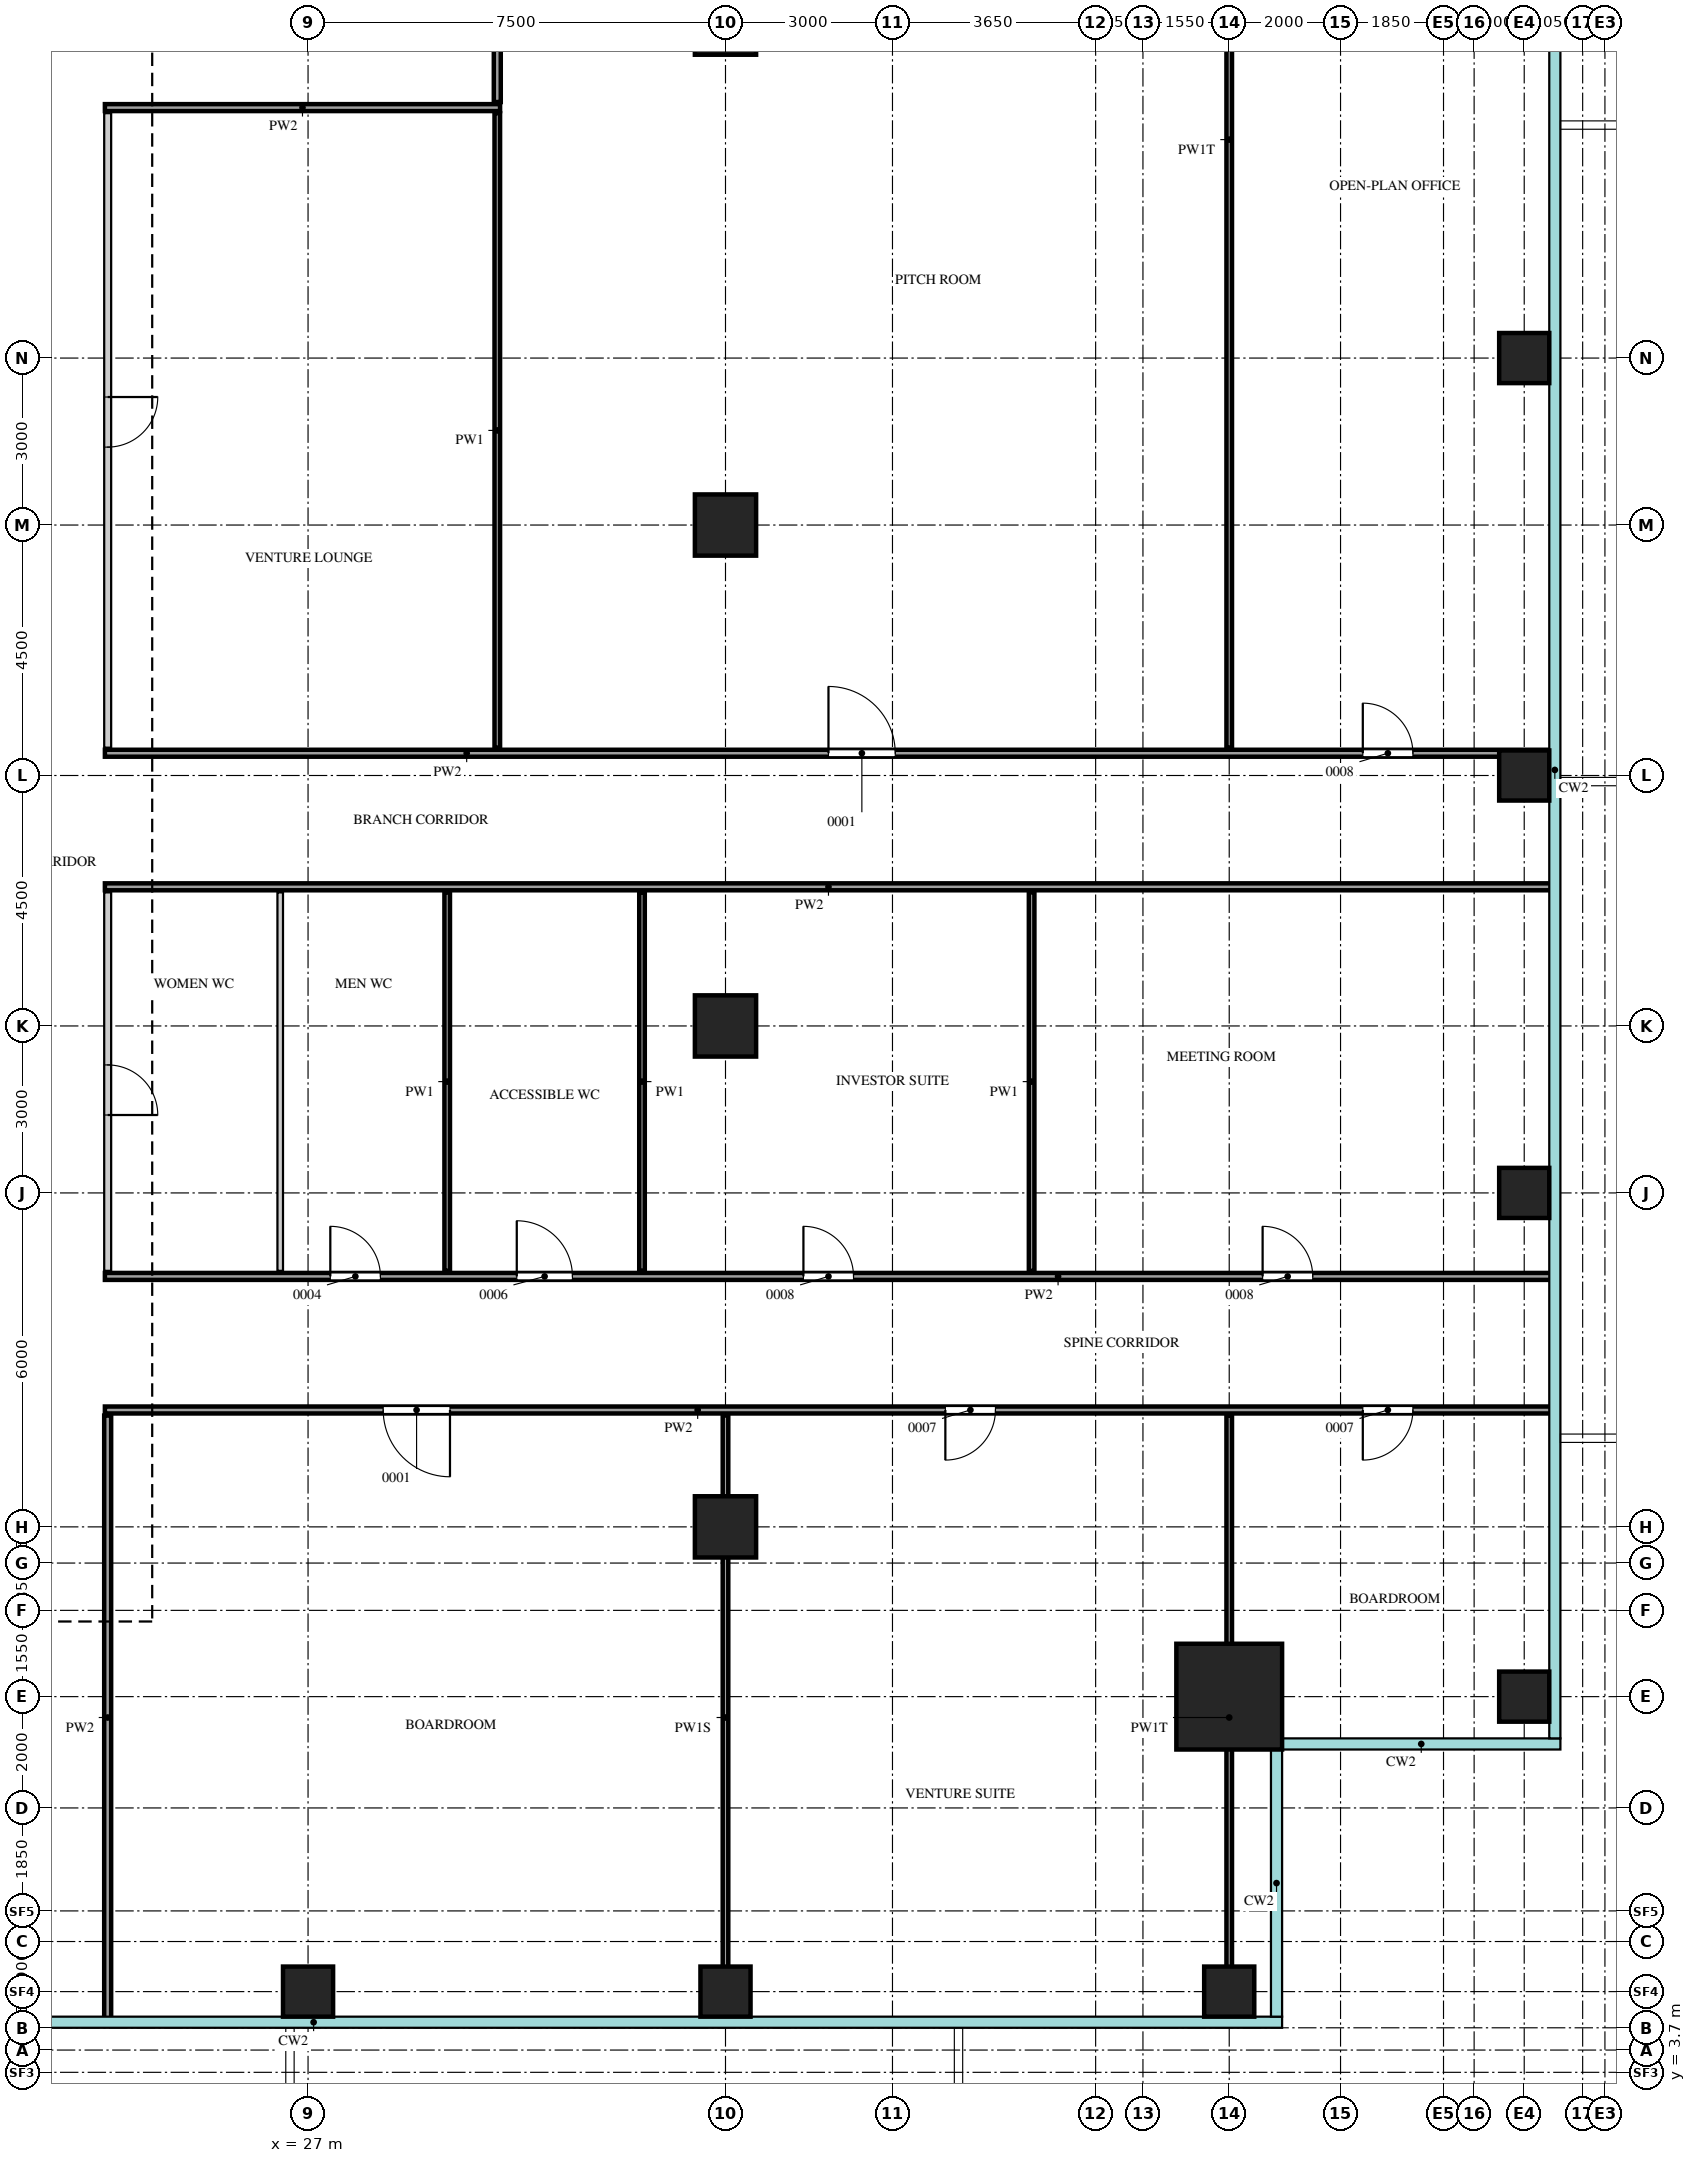
"""IFC4 building model, lengths in metres.
Left out: names, types, materials, properties, quantities, classifications, styles, units other than length and angle.
Written with IfcOpenShell. Run it as: python <this file> out.ifc"""

import sys

from ifc_helpers import new_model, si_unit, direction, frame, frame_2d, origin, origin_2d, place, context, subcontext, project, spatial, rectangle, extrude, source, transform, mapped, element, fill, save


model = new_model("IFC4")
c1 = context("Model", 3, precision=1e-05, world=origin(), true_north=direction((0.0, 1.0)))
c2 = subcontext(c1, "Body", "Model", "MODEL_VIEW")
j1 = project(units=[si_unit("LENGTHUNIT", "METRE"), si_unit("PLANEANGLEUNIT", "RADIAN")], contexts=[c1])
p1 = place(None, origin())
s1 = spatial("IfcSite", under=j1, at=p1, CompositionType="ELEMENT")
p2 = place(p1, origin())
s2 = spatial("IfcBuilding", under=s1, at=p2, CompositionType="ELEMENT")
p3 = place(p2, frame((0.0, 0.0, 238.2)))
s3 = spatial("IfcBuildingStorey", under=s2, at=p3, CompositionType="ELEMENT", Elevation=238.2)
m1 = source(origin(), c2, "Body", "SweptSolid", [
    extrude(rectangle(XDim=1.9, YDim=1.9, at=origin_2d()), origin(), (0.0, 0.0, 1.0), 4.0),
])
p4 = place(p3, frame((43.55, 10.45, 0.0), z_axis=(0.0, 0.0, 1.0), x_axis=(1.0, 0.0, 0.0)))
e1 = element("IfcColumn", 1, at=p4, inside=s3, PredefinedType="COLUMN", context=c2, shape_type="MappedRepresentation", body=[
    mapped(m1, transform((0.0, 0.0, 0.0))),
])
m2 = source(origin(), c2, "Body", "SweptSolid", [
    extrude(rectangle(XDim=0.9, YDim=0.9, at=origin_2d()), origin(), (0.0, 0.0, 1.0), 3.75),
])
for number, where, z_axis, x_axis in (
    (2, (27.0, 5.15, 0.0), (0.0, 0.0, 1.0), (1.0, 0.0, 0.0)),
    (3, (34.5, 5.15, 0.0), (0.0, 0.0, 1.0), (1.0, 0.0, 0.0)),
    (4, (43.55, 5.15, 0.0), (0.0, 0.0, 1.0), (1.0, 0.0, 0.0)),
    (5, (48.85, 10.45, 0.0), (0.0, 0.0, 1.0), (1.0, 0.0, 0.0)),
    (6, (48.85, 19.5, 0.0), (0.0, 0.0, 1.0), (1.0, 0.0, 0.0)),
    (7, (48.85, 27.0, 0.0), (0.0, 0.0, 1.0), (1.0, 0.0, 0.0)),
    (8, (48.85, 34.5, 0.0), (0.0, 0.0, 1.0), (1.0, 0.0, 0.0)),
):
    element("IfcColumn", number, at=place(p3, frame(where, z_axis=z_axis, x_axis=x_axis)), inside=s3, PredefinedType="COLUMN", context=c2, shape_type="MappedRepresentation", body=[
        mapped(m2, transform((0.0, 0.0, 0.0))),
    ])
m3 = source(origin(), c2, "Body", "SweptSolid", [
    extrude(rectangle(XDim=1.1, YDim=1.1, at=origin_2d()), origin(), (0.0, 0.0, 1.0), 3.75),
])
for number, where, z_axis, x_axis in (
    (9, (34.5, 13.5, 0.0), (0.0, 0.0, 1.0), (1.0, 0.0, 0.0)),
    (10, (34.5, 22.5, 0.0), (0.0, 0.0, 1.0), (1.0, 0.0, 0.0)),
    (11, (34.5, 31.5, 0.0), (0.0, 0.0, 1.0), (1.0, 0.0, 0.0)),
    (12, (34.5, 40.5, 0.0), (0.0, 0.0, 1.0), (1.0, 0.0, 0.0)),
):
    element("IfcColumn", number, at=place(p3, frame(where, z_axis=z_axis, x_axis=x_axis)), inside=s3, PredefinedType="COLUMN", context=c2, shape_type="MappedRepresentation", body=[
        mapped(m3, transform((0.0, 0.0, 0.0))),
    ])
m4 = source(origin(), c2, "Body", "SweptSolid", [
    extrude(rectangle(XDim=10.85, YDim=0.125, at=frame_2d((5.425, 0.0))), origin(), (0.0, 0.0, 1.0), 3.8),
])
p5 = place(p3, frame((23.4, 4.65, 0.0), z_axis=(0.0, 0.0, 1.0), x_axis=(0.0, 1.0, 0.0)))
e13 = element("IfcWall", 13, at=p5, inside=s3, PredefinedType="PARTITIONING", context=c2, shape_type="MappedRepresentation", body=[
    mapped(m4, transform((0.0, 0.0, 0.0))),
])
m5 = source(origin(), c2, "Body", "SweptSolid", [
    extrude(rectangle(XDim=10.85, YDim=0.1, at=frame_2d((5.425, 0.0))), origin(), (0.0, 0.0, 1.0), 3.35),
])
p6 = place(p3, frame((34.5, 4.65, 0.0), z_axis=(0.0, 0.0, 1.0), x_axis=(0.0, 1.0, 0.0)))
e14 = element("IfcWall", 14, at=p6, inside=s3, PredefinedType="PARTITIONING", context=c2, shape_type="MappedRepresentation", body=[
    mapped(m5, transform((0.0, 0.0, 0.0))),
])
m6 = source(origin(), c2, "Body", "SweptSolid", [
    extrude(rectangle(XDim=10.85, YDim=0.1, at=frame_2d((5.425, 0.0))), origin(), (0.0, 0.0, 1.0), 3.3),
])
p7 = place(p3, frame((43.55, 4.65, 0.0), z_axis=(0.0, 0.0, 1.0), x_axis=(0.0, 1.0, 0.0)))
e15 = element("IfcWall", 15, at=p7, inside=s3, PredefinedType="PARTITIONING", context=c2, shape_type="MappedRepresentation", body=[
    mapped(m6, transform((0.0, 0.0, 0.0))),
])
m7 = source(origin(), c2, "Body", "SweptSolid", [
    extrude(rectangle(XDim=26.0, YDim=0.125, at=frame_2d((13.0, 0.0))), origin(), (0.0, 0.0, 1.0), 3.8),
])
p8 = place(p3, frame((23.35, 15.6, 0.0), z_axis=(0.0, 0.0, 1.0), x_axis=(1.0, 0.0, 0.0)))
e16 = element("IfcWall", 16, at=p8, inside=s3, PredefinedType="PARTITIONING", context=c2, shape_type="MappedRepresentation", body=[
    mapped(m7, transform((0.0, 0.0, 0.0))),
])
m8 = source(origin(), c2, "Body", "SweptSolid", [
    extrude(rectangle(XDim=1.2, YDim=2.1, at=frame_2d((0.6, 1.05))), frame((0.0, 0.073, 0.0), z_axis=(0.0, -1.0, 0.0), x_axis=(1.0, 0.0, 0.0)), (0.0, 0.0, 1.0), 0.145),
])
p9 = place(p8, frame((5.0, 0.0, 0.0)))
e17 = element("IfcOpeningElement", 17, at=p9, cuts=e16, PredefinedType="OPENING", context=c2, shape_type="MappedRepresentation", body=[
    mapped(m8, transform((0.0, 0.0, 0.0))),
])
m9 = source(origin(), c2, "Body", "SweptSolid", [
    extrude(rectangle(XDim=0.9, YDim=2.1, at=frame_2d((0.45, 1.05))), frame((0.0, 0.073, 0.0), z_axis=(0.0, -1.0, 0.0), x_axis=(1.0, 0.0, 0.0)), (0.0, 0.0, 1.0), 0.145),
])
p10 = place(p8, frame((15.1, 0.0, 0.0)))
e18 = element("IfcOpeningElement", 18, at=p10, cuts=e16, PredefinedType="OPENING", context=c2, shape_type="MappedRepresentation", body=[
    mapped(m9, transform((0.0, 0.0, 0.0))),
])
p11 = place(p8, frame((22.6, 0.0, 0.0)))
e19 = element("IfcOpeningElement", 19, at=p11, cuts=e16, PredefinedType="OPENING", context=c2, shape_type="MappedRepresentation", body=[
    mapped(m9, transform((0.0, 0.0, 0.0))),
])
p12 = place(p3, frame((23.35, 18.0, 0.0), z_axis=(0.0, 0.0, 1.0), x_axis=(1.0, 0.0, 0.0)))
e20 = element("IfcWall", 20, at=p12, inside=s3, PredefinedType="PARTITIONING", context=c2, shape_type="MappedRepresentation", body=[
    mapped(m7, transform((0.0, 0.0, 0.0))),
])
p13 = place(p12, frame((4.05, 0.0, 0.0)))
e21 = element("IfcOpeningElement", 21, at=p13, cuts=e20, PredefinedType="OPENING", context=c2, shape_type="MappedRepresentation", body=[
    mapped(m9, transform((0.0, 0.0, 0.0))),
])
m10 = source(origin(), c2, "Body", "SweptSolid", [
    extrude(rectangle(XDim=1.0, YDim=2.1, at=frame_2d((0.5, 1.05))), frame((0.0, 0.073, 0.0), z_axis=(0.0, -1.0, 0.0), x_axis=(1.0, 0.0, 0.0)), (0.0, 0.0, 1.0), 0.145),
])
p14 = place(p12, frame((7.4, 0.0, 0.0)))
e22 = element("IfcOpeningElement", 22, at=p14, cuts=e20, PredefinedType="OPENING", context=c2, shape_type="MappedRepresentation", body=[
    mapped(m10, transform((0.0, 0.0, 0.0))),
])
p15 = place(p12, frame((12.55, 0.0, 0.0)))
e23 = element("IfcOpeningElement", 23, at=p15, cuts=e20, PredefinedType="OPENING", context=c2, shape_type="MappedRepresentation", body=[
    mapped(m9, transform((0.0, 0.0, 0.0))),
])
p16 = place(p12, frame((20.8, 0.0, 0.0)))
e24 = element("IfcOpeningElement", 24, at=p16, cuts=e20, PredefinedType="OPENING", context=c2, shape_type="MappedRepresentation", body=[
    mapped(m9, transform((0.0, 0.0, 0.0))),
])
m11 = source(origin(), c2, "Body", "SweptSolid", [
    extrude(rectangle(XDim=6.8, YDim=0.125, at=frame_2d((3.4, 0.0))), origin(), (0.0, 0.0, 1.0), 3.8),
])
p17 = place(p3, frame((23.4, 18.1, 0.0), z_axis=(0.0, 0.0, 1.0), x_axis=(0.0, 1.0, 0.0)))
e25 = element("IfcWall", 25, at=p17, inside=s3, PredefinedType="PARTITIONING", context=c2, shape_type="MappedRepresentation", body=[
    mapped(m11, transform((0.0, 0.0, 0.0))),
])
p18 = place(p17, frame((2.8, 0.0, 0.0)))
e26 = element("IfcOpeningElement", 26, at=p18, cuts=e25, PredefinedType="OPENING", context=c2, shape_type="MappedRepresentation", body=[
    mapped(m9, transform((0.0, 0.0, 0.0))),
])
m12 = source(origin(), c2, "Body", "SweptSolid", [
    extrude(rectangle(XDim=6.8, YDim=0.1, at=frame_2d((3.4, 0.0))), origin(), (0.0, 0.0, 1.0), 3.8),
])
for number, where, z_axis, x_axis in (
    (27, (26.5, 18.1, 0.0), (0.0, 0.0, 1.0), (0.0, 1.0, 0.0)),
    (28, (29.5, 18.1, 0.0), (0.0, 0.0, 1.0), (0.0, 1.0, 0.0)),
    (29, (33.0, 18.1, 0.0), (0.0, 0.0, 1.0), (0.0, 1.0, 0.0)),
    (30, (40.0, 18.1, 0.0), (0.0, 0.0, 1.0), (0.0, 1.0, 0.0)),
):
    element("IfcWall", number, at=place(p3, frame(where, z_axis=z_axis, x_axis=x_axis)), inside=s3, PredefinedType="PARTITIONING", context=c2, shape_type="MappedRepresentation", body=[
        mapped(m12, transform((0.0, 0.0, 0.0))),
    ])
p19 = place(p3, frame((23.35, 25.0, 0.0), z_axis=(0.0, 0.0, 1.0), x_axis=(1.0, 0.0, 0.0)))
e31 = element("IfcWall", 31, at=p19, inside=s3, PredefinedType="PARTITIONING", context=c2, shape_type="MappedRepresentation", body=[
    mapped(m7, transform((0.0, 0.0, 0.0))),
])
p20 = place(p3, frame((23.35, 27.4, 0.0), z_axis=(0.0, 0.0, 1.0), x_axis=(1.0, 0.0, 0.0)))
e32 = element("IfcWall", 32, at=p20, inside=s3, PredefinedType="PARTITIONING", context=c2, shape_type="MappedRepresentation", body=[
    mapped(m7, transform((0.0, 0.0, 0.0))),
])
p21 = place(p20, frame((13.0, 0.0, 0.0)))
e33 = element("IfcOpeningElement", 33, at=p21, cuts=e32, PredefinedType="OPENING", context=c2, shape_type="MappedRepresentation", body=[
    mapped(m8, transform((0.0, 0.0, 0.0))),
])
p22 = place(p20, frame((22.6, 0.0, 0.0)))
e34 = element("IfcOpeningElement", 34, at=p22, cuts=e32, PredefinedType="OPENING", context=c2, shape_type="MappedRepresentation", body=[
    mapped(m9, transform((0.0, 0.0, 0.0))),
])
m13 = source(origin(), c2, "Body", "SweptSolid", [
    extrude(rectangle(XDim=11.4, YDim=0.125, at=frame_2d((5.7, 0.0))), origin(), (0.0, 0.0, 1.0), 3.8),
])
p23 = place(p3, frame((23.4, 27.5, 0.0), z_axis=(0.0, 0.0, 1.0), x_axis=(0.0, 1.0, 0.0)))
e35 = element("IfcWall", 35, at=p23, inside=s3, PredefinedType="PARTITIONING", context=c2, shape_type="MappedRepresentation", body=[
    mapped(m13, transform((0.0, 0.0, 0.0))),
])
p24 = place(p23, frame((5.4, 0.0, 0.0)))
e36 = element("IfcOpeningElement", 36, at=p24, cuts=e35, PredefinedType="OPENING", context=c2, shape_type="MappedRepresentation", body=[
    mapped(m9, transform((0.0, 0.0, 0.0))),
])
m14 = source(origin(), c2, "Body", "SweptSolid", [
    extrude(rectangle(XDim=11.4, YDim=0.1, at=frame_2d((5.7, 0.0))), origin(), (0.0, 0.0, 1.0), 3.8),
])
p25 = place(p3, frame((30.4, 27.5, 0.0), z_axis=(0.0, 0.0, 1.0), x_axis=(0.0, 1.0, 0.0)))
e37 = element("IfcWall", 37, at=p25, inside=s3, PredefinedType="PARTITIONING", context=c2, shape_type="MappedRepresentation", body=[
    mapped(m14, transform((0.0, 0.0, 0.0))),
])
m15 = source(origin(), c2, "Body", "SweptSolid", [
    extrude(rectangle(XDim=21.85, YDim=0.1, at=frame_2d((10.925, 0.0))), origin(), (0.0, 0.0, 1.0), 3.3),
])
p26 = place(p3, frame((43.55, 27.5, 0.0), z_axis=(0.0, 0.0, 1.0), x_axis=(0.0, 1.0, 0.0)))
e38 = element("IfcWall", 38, at=p26, inside=s3, PredefinedType="PARTITIONING", context=c2, shape_type="MappedRepresentation", body=[
    mapped(m15, transform((0.0, 0.0, 0.0))),
])
m16 = source(origin(), c2, "Body", "SweptSolid", [
    extrude(rectangle(XDim=7.1, YDim=0.125, at=frame_2d((3.55, 0.0))), origin(), (0.0, 0.0, 1.0), 3.8),
])
p27 = place(p3, frame((23.35, 39.0, 0.0), z_axis=(0.0, 0.0, 1.0), x_axis=(1.0, 0.0, 0.0)))
e39 = element("IfcWall", 39, at=p27, inside=s3, PredefinedType="PARTITIONING", context=c2, shape_type="MappedRepresentation", body=[
    mapped(m16, transform((0.0, 0.0, 0.0))),
])
m17 = source(origin(), c2, "Body", "SweptSolid", [
    extrude(rectangle(XDim=6.6, YDim=0.125, at=frame_2d((3.3, 0.0))), origin(), (0.0, 0.0, 1.0), 3.8),
])
p28 = place(p3, frame((30.4, 39.1, 0.0), z_axis=(0.0, 0.0, 1.0), x_axis=(0.0, 1.0, 0.0)))
e40 = element("IfcWall", 40, at=p28, inside=s3, PredefinedType="PARTITIONING", context=c2, shape_type="MappedRepresentation", body=[
    mapped(m17, transform((0.0, 0.0, 0.0))),
])
m18 = source(origin(), c2, "Body", "SweptSolid", [
    extrude(rectangle(XDim=1.2, YDim=2.1, at=frame_2d((0.6, 1.05))), frame((0.0, 0.025, 0.0), z_axis=(0.0, -1.0, 0.0), x_axis=(1.0, 0.0, 0.0)), (0.0, 0.0, 1.0), 0.05),
])
p29 = place(p9, origin())
e41 = element("IfcDoor", 41, at=p29, inside=s3, OperationType="SINGLE_SWING_RIGHT", PredefinedType="DOOR", context=c2, shape_type="MappedRepresentation", body=[
    mapped(m18, transform((0.0, 0.0, 0.0))),
])
fill(e17, e41)
m19 = source(origin(), c2, "Body", "SweptSolid", [
    extrude(rectangle(XDim=0.9, YDim=2.1, at=frame_2d((0.45, 1.05))), frame((0.0, 0.025, 0.0), z_axis=(0.0, -1.0, 0.0), x_axis=(1.0, 0.0, 0.0)), (0.0, 0.0, 1.0), 0.05),
])
p30 = place(p10, origin())
e42 = element("IfcDoor", 42, at=p30, inside=s3, OperationType="SINGLE_SWING_LEFT", PredefinedType="DOOR", context=c2, shape_type="MappedRepresentation", body=[
    mapped(m19, transform((0.0, 0.0, 0.0))),
])
fill(e18, e42)
p31 = place(p11, origin())
e43 = element("IfcDoor", 43, at=p31, inside=s3, OperationType="SINGLE_SWING_LEFT", PredefinedType="DOOR", context=c2, shape_type="MappedRepresentation", body=[
    mapped(m19, transform((0.0, 0.0, 0.0))),
])
fill(e19, e43)
p32 = place(p18, origin())
e44 = element("IfcDoor", 44, at=p32, inside=s3, OperationType="SINGLE_SWING_LEFT", PredefinedType="DOOR", context=c2, shape_type="MappedRepresentation", body=[
    mapped(m19, transform((0.0, 0.0, 0.0))),
])
fill(e26, e44)
p33 = place(p13, origin())
e45 = element("IfcDoor", 45, at=p33, inside=s3, OperationType="SINGLE_SWING_RIGHT", PredefinedType="DOOR", context=c2, shape_type="MappedRepresentation", body=[
    mapped(m19, transform((0.0, 0.0, 0.0))),
])
fill(e21, e45)
m20 = source(origin(), c2, "Body", "SweptSolid", [
    extrude(rectangle(XDim=1.0, YDim=2.1, at=frame_2d((0.5, 1.05))), frame((0.0, 0.025, 0.0), z_axis=(0.0, -1.0, 0.0), x_axis=(1.0, 0.0, 0.0)), (0.0, 0.0, 1.0), 0.05),
])
p34 = place(p14, origin())
e46 = element("IfcDoor", 46, at=p34, inside=s3, OperationType="SINGLE_SWING_RIGHT", PredefinedType="DOOR", context=c2, shape_type="MappedRepresentation", body=[
    mapped(m20, transform((0.0, 0.0, 0.0))),
])
fill(e22, e46)
p35 = place(p15, origin())
e47 = element("IfcDoor", 47, at=p35, inside=s3, OperationType="SINGLE_SWING_RIGHT", PredefinedType="DOOR", context=c2, shape_type="MappedRepresentation", body=[
    mapped(m19, transform((0.0, 0.0, 0.0))),
])
fill(e23, e47)
p36 = place(p16, origin())
e48 = element("IfcDoor", 48, at=p36, inside=s3, OperationType="SINGLE_SWING_RIGHT", PredefinedType="DOOR", context=c2, shape_type="MappedRepresentation", body=[
    mapped(m19, transform((0.0, 0.0, 0.0))),
])
fill(e24, e48)
p37 = place(p24, origin())
e49 = element("IfcDoor", 49, at=p37, inside=s3, OperationType="SINGLE_SWING_RIGHT", PredefinedType="DOOR", context=c2, shape_type="MappedRepresentation", body=[
    mapped(m19, transform((0.0, 0.0, 0.0))),
])
fill(e36, e49)
p38 = place(p21, origin())
e50 = element("IfcDoor", 50, at=p38, inside=s3, OperationType="SINGLE_SWING_RIGHT", PredefinedType="DOOR", context=c2, shape_type="MappedRepresentation", body=[
    mapped(m18, transform((0.0, 0.0, 0.0))),
])
fill(e33, e50)
p39 = place(p22, origin())
e51 = element("IfcDoor", 51, at=p39, inside=s3, OperationType="SINGLE_SWING_RIGHT", PredefinedType="DOOR", context=c2, shape_type="MappedRepresentation", body=[
    mapped(m19, transform((0.0, 0.0, 0.0))),
])
fill(e34, e51)
save(model, sys.argv[1])
